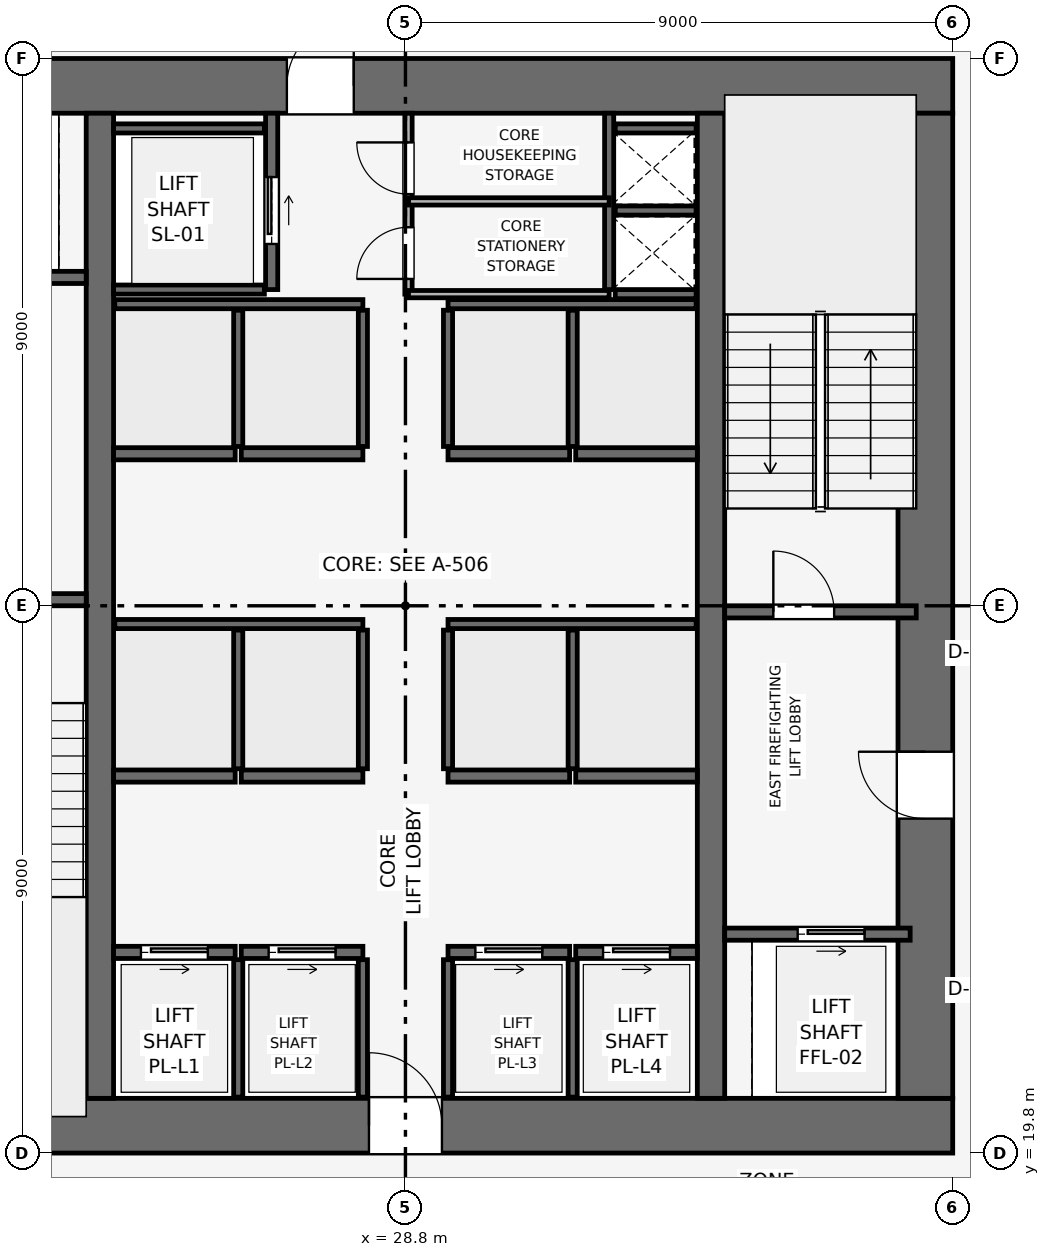
"""IFC4 building model, lengths in metres.
Left out: names, types, materials, properties, quantities, classifications, styles, units other than length and angle.
Written with IfcOpenShell. Run it as: python <this file> out.ifc"""

import sys

from ifc_helpers import new_model, si_unit, direction, frame, frame_2d, origin, place, context, subcontext, project, spatial, rectangle, extrude, element, fill, save


model = new_model("IFC4")
c1 = context("Model", 3, precision=1e-05, world=origin(), true_north=direction((0.0, 1.0)))
c2 = subcontext(c1, "Body", "Model", "MODEL_VIEW")
j1 = project(units=[si_unit("LENGTHUNIT", "METRE"), si_unit("PLANEANGLEUNIT", "RADIAN")], contexts=[c1])
p1 = place(None, origin())
s1 = spatial("IfcSite", under=j1, at=p1, CompositionType="ELEMENT")
p2 = place(p1, origin())
s2 = spatial("IfcBuilding", under=s1, at=p2, CompositionType="ELEMENT")
p3 = place(p2, frame((0.0, 0.0, 129.0)))
s3 = spatial("IfcBuildingStorey", under=s2, at=p3, CompositionType="ELEMENT", Elevation=129.0)
p4 = place(p3, frame((19.8, 20.25, 0.0), z_axis=(0.0, 0.0, 1.0), x_axis=(1.0, 0.0, 0.0)))
e1 = element("IfcWall", 1, at=p4, inside=s3, PredefinedType="SHEAR", context=c2, shape_type="SweptSolid", body=[
    extrude(rectangle(XDim=18.0, YDim=0.9, at=frame_2d((9.0, 0.0))), origin(), (0.0, 0.0, 1.0), 3.9),
])
p5 = place(p4, frame((8.4, 0.0, 0.0)))
e2 = element("IfcOpeningElement", 2, at=p5, cuts=e1, PredefinedType="OPENING", context=c2, shape_type="SweptSolid", body=[
    extrude(rectangle(XDim=1.2, YDim=2.2, at=frame_2d((0.6, 1.1))), frame((0.0, 0.46, 0.0), z_axis=(0.0, -1.0, 0.0), x_axis=(1.0, 0.0, 0.0)), (0.0, 0.0, 1.0), 0.92),
])
p6 = place(p3, frame((19.8, 37.35, 0.0), z_axis=(0.0, 0.0, 1.0), x_axis=(1.0, 0.0, 0.0)))
e3 = element("IfcWall", 3, at=p6, inside=s3, PredefinedType="SHEAR", context=c2, shape_type="SweptSolid", body=[
    extrude(rectangle(XDim=18.0, YDim=0.9, at=frame_2d((9.0, 0.0))), origin(), (0.0, 0.0, 1.0), 3.9),
])
p7 = place(p6, frame((7.05, 0.0, 0.0)))
e4 = element("IfcOpeningElement", 4, at=p7, cuts=e3, PredefinedType="OPENING", context=c2, shape_type="SweptSolid", body=[
    extrude(rectangle(XDim=1.1, YDim=2.15, at=frame_2d((0.55, 1.075))), frame((0.0, 0.46, 0.0), z_axis=(0.0, -1.0, 0.0), x_axis=(1.0, 0.0, 0.0)), (0.0, 0.0, 1.0), 0.92),
])
p8 = place(p3, frame((37.35, 20.7, 0.0), z_axis=(0.0, 0.0, 1.0), x_axis=(0.0, 1.0, 0.0)))
e5 = element("IfcWall", 5, at=p8, inside=s3, PredefinedType="SHEAR", context=c2, shape_type="SweptSolid", body=[
    extrude(rectangle(XDim=16.2, YDim=0.9, at=frame_2d((8.1, 0.0))), origin(), (0.0, 0.0, 1.0), 3.9),
])
p9 = place(p8, frame((4.6, 0.0, 0.0)))
e6 = element("IfcOpeningElement", 6, at=p9, cuts=e5, PredefinedType="OPENING", context=c2, shape_type="SweptSolid", body=[
    extrude(rectangle(XDim=1.1, YDim=2.15, at=frame_2d((0.55, 1.075))), frame((0.0, 0.46, 0.0), z_axis=(0.0, -1.0, 0.0), x_axis=(1.0, 0.0, 0.0)), (0.0, 0.0, 1.0), 0.92),
])
for number, where, z_axis, x_axis in (
    (7, (23.775, 20.7, 0.0), (0.0, 0.0, 1.0), (0.0, 1.0, 0.0)),
    (8, (33.825, 20.7, 0.0), (0.0, 0.0, 1.0), (0.0, 1.0, 0.0)),
):
    element("IfcWall", number, at=place(p3, frame(where, z_axis=z_axis, x_axis=x_axis)), inside=s3, PredefinedType="SHEAR", context=c2, shape_type="SweptSolid", body=[
        extrude(rectangle(XDim=16.2, YDim=0.45, at=frame_2d((8.1, 0.0))), origin(), (0.0, 0.0, 1.0), 3.9),
    ])
p10 = place(p3, frame((20.4, 28.9, 0.0), z_axis=(0.0, 0.0, 1.0), x_axis=(1.0, 0.0, 0.0)))
e9 = element("IfcWall", 9, at=p10, inside=s3, PredefinedType="SHEAR", context=c2, shape_type="SweptSolid", body=[
    extrude(rectangle(XDim=3.15, YDim=0.2, at=frame_2d((1.575, 0.0))), origin(), (0.0, 0.0, 1.0), 3.65),
])
p11 = place(p10, frame((0.8, 0.0, 0.0)))
e10 = element("IfcOpeningElement", 10, at=p11, cuts=e9, PredefinedType="OPENING", context=c2, shape_type="SweptSolid", body=[
    extrude(rectangle(XDim=1.0, YDim=2.1, at=frame_2d((0.5, 1.05))), frame((0.0, 0.11, 0.0), z_axis=(0.0, -1.0, 0.0), x_axis=(1.0, 0.0, 0.0)), (0.0, 0.0, 1.0), 0.22),
])
p12 = place(p3, frame((34.05, 28.7, 0.0), z_axis=(0.0, 0.0, 1.0), x_axis=(1.0, 0.0, 0.0)))
e11 = element("IfcWall", 11, at=p12, inside=s3, PredefinedType="SHEAR", context=c2, shape_type="SweptSolid", body=[
    extrude(rectangle(XDim=3.15, YDim=0.2, at=frame_2d((1.575, 0.0))), origin(), (0.0, 0.0, 1.0), 3.65),
])
p13 = place(p12, frame((0.8, 0.0, 0.0)))
e12 = element("IfcOpeningElement", 12, at=p13, cuts=e11, PredefinedType="OPENING", context=c2, shape_type="SweptSolid", body=[
    extrude(rectangle(XDim=1.0, YDim=2.1, at=frame_2d((0.5, 1.05))), frame((0.0, 0.11, 0.0), z_axis=(0.0, -1.0, 0.0), x_axis=(1.0, 0.0, 0.0)), (0.0, 0.0, 1.0), 0.22),
])
p14 = place(p3, frame((32.15, 34.0, 0.0), z_axis=(0.0, 0.0, 1.0), x_axis=(0.0, 1.0, 0.0)))
e13 = element("IfcWall", 13, at=p14, inside=s3, PredefinedType="SHEAR", context=c2, shape_type="SweptSolid", body=[
    extrude(rectangle(XDim=2.9, YDim=0.15, at=frame_2d((1.45, 0.0))), origin(), (0.0, 0.0, 1.0), 3.65),
])
for number, where, z_axis, x_axis in (
    (14, (32.25, 33.925, 0.0), (0.0, 0.0, 1.0), (1.0, 0.0, 0.0)),
    (15, (32.25, 35.3, 0.0), (0.0, 0.0, 1.0), (1.0, 0.0, 0.0)),
):
    element("IfcWall", number, at=place(p3, frame(where, z_axis=z_axis, x_axis=x_axis)), inside=s3, PredefinedType="SHEAR", context=c2, shape_type="SweptSolid", body=[
        extrude(rectangle(XDim=1.33, YDim=0.15, at=frame_2d((0.665, 0.0))), origin(), (0.0, 0.0, 1.0), 3.65),
    ])
p15 = place(p3, frame((20.5, 34.2, 0.0), z_axis=(0.0, 0.0, 1.0), x_axis=(1.0, 0.0, 0.0)))
e16 = element("IfcWall", 16, at=p15, inside=s3, PredefinedType="SHEAR", context=c2, shape_type="SweptSolid", body=[
    extrude(rectangle(XDim=3.05, YDim=0.2, at=frame_2d((1.525, 0.0))), origin(), (0.0, 0.0, 1.0), 3.65),
])
p16 = place(p15, frame((0.75, 0.0, 0.0)))
e17 = element("IfcOpeningElement", 17, at=p16, cuts=e16, PredefinedType="OPENING", context=c2, shape_type="SweptSolid", body=[
    extrude(rectangle(XDim=1.1, YDim=2.15, at=frame_2d((0.55, 1.075))), frame((0.0, 0.11, 0.0), z_axis=(0.0, -1.0, 0.0), x_axis=(1.0, 0.0, 0.0)), (0.0, 0.0, 1.0), 0.22),
])
p17 = place(p3, frame((34.05, 23.4, 0.0), z_axis=(0.0, 0.0, 1.0), x_axis=(1.0, 0.0, 0.0)))
e18 = element("IfcWall", 18, at=p17, inside=s3, PredefinedType="SHEAR", context=c2, shape_type="SweptSolid", body=[
    extrude(rectangle(XDim=3.05, YDim=0.2, at=frame_2d((1.525, 0.0))), origin(), (0.0, 0.0, 1.0), 3.65),
])
p18 = place(p17, frame((1.2, 0.0, 0.0)))
e19 = element("IfcOpeningElement", 19, at=p18, cuts=e18, PredefinedType="OPENING", context=c2, shape_type="SweptSolid", body=[
    extrude(rectangle(XDim=1.1, YDim=2.15, at=frame_2d((0.55, 1.075))), frame((0.0, 0.11, 0.0), z_axis=(0.0, -1.0, 0.0), x_axis=(1.0, 0.0, 0.0)), (0.0, 0.0, 1.0), 0.22),
])
p19 = place(p3, frame((26.6, 34.0, 0.0), z_axis=(0.0, 0.0, 1.0), x_axis=(0.0, 1.0, 0.0)))
e20 = element("IfcWall", 20, at=p19, inside=s3, PredefinedType="SHEAR", context=c2, shape_type="SweptSolid", body=[
    extrude(rectangle(XDim=2.9, YDim=0.2, at=frame_2d((1.45, 0.0))), origin(), (0.0, 0.0, 1.0), 3.65),
])
p20 = place(p19, frame((0.75, 0.0, 0.0)))
e21 = element("IfcOpeningElement", 21, at=p20, cuts=e20, PredefinedType="OPENING", context=c2, shape_type="SweptSolid", body=[
    extrude(rectangle(XDim=1.1, YDim=2.15, at=frame_2d((0.55, 1.075))), frame((0.0, 0.11, 0.0), z_axis=(0.0, -1.0, 0.0), x_axis=(1.0, 0.0, 0.0)), (0.0, 0.0, 1.0), 0.22),
])
for number, where, z_axis, x_axis in (
    (22, (24.0, 34.0, 0.0), (0.0, 0.0, 1.0), (1.0, 0.0, 0.0)),
    (23, (24.0, 36.65, 0.0), (0.0, 0.0, 1.0), (1.0, 0.0, 0.0)),
):
    element("IfcWall", number, at=place(p3, frame(where, z_axis=z_axis, x_axis=x_axis)), inside=s3, PredefinedType="SHEAR", context=c2, shape_type="SweptSolid", body=[
        extrude(rectangle(XDim=2.48, YDim=0.15, at=frame_2d((1.24, 0.0))), origin(), (0.0, 0.0, 1.0), 3.65),
    ])
p21 = place(p3, frame((24.0, 23.1, 0.0), z_axis=(0.0, 0.0, 1.0), x_axis=(1.0, 0.0, 0.0)))
e24 = element("IfcWall", 24, at=p21, inside=s3, PredefinedType="SHEAR", context=c2, shape_type="SweptSolid", body=[
    extrude(rectangle(XDim=2.0, YDim=0.2, at=frame_2d((1.0, 0.0))), origin(), (0.0, 0.0, 1.0), 3.65),
])
p22 = place(p21, frame((0.45, 0.0, 0.0)))
e25 = element("IfcOpeningElement", 25, at=p22, cuts=e24, PredefinedType="OPENING", context=c2, shape_type="SweptSolid", body=[
    extrude(rectangle(XDim=1.1, YDim=2.15, at=frame_2d((0.55, 1.075))), frame((0.0, 0.11, 0.0), z_axis=(0.0, -1.0, 0.0), x_axis=(1.0, 0.0, 0.0)), (0.0, 0.0, 1.0), 0.22),
])
p23 = place(p3, frame((26.1, 23.1, 0.0), z_axis=(0.0, 0.0, 1.0), x_axis=(1.0, 0.0, 0.0)))
e26 = element("IfcWall", 26, at=p23, inside=s3, PredefinedType="SHEAR", context=c2, shape_type="SweptSolid", body=[
    extrude(rectangle(XDim=2.0, YDim=0.2, at=frame_2d((1.0, 0.0))), origin(), (0.0, 0.0, 1.0), 3.65),
])
p24 = place(p23, frame((0.45, 0.0, 0.0)))
e27 = element("IfcOpeningElement", 27, at=p24, cuts=e26, PredefinedType="OPENING", context=c2, shape_type="SweptSolid", body=[
    extrude(rectangle(XDim=1.1, YDim=2.15, at=frame_2d((0.55, 1.075))), frame((0.0, 0.11, 0.0), z_axis=(0.0, -1.0, 0.0), x_axis=(1.0, 0.0, 0.0)), (0.0, 0.0, 1.0), 0.22),
])
p25 = place(p3, frame((29.5, 23.1, 0.0), z_axis=(0.0, 0.0, 1.0), x_axis=(1.0, 0.0, 0.0)))
e28 = element("IfcWall", 28, at=p25, inside=s3, PredefinedType="SHEAR", context=c2, shape_type="SweptSolid", body=[
    extrude(rectangle(XDim=2.0, YDim=0.2, at=frame_2d((1.0, 0.0))), origin(), (0.0, 0.0, 1.0), 3.65),
])
p26 = place(p25, frame((0.45, 0.0, 0.0)))
e29 = element("IfcOpeningElement", 29, at=p26, cuts=e28, PredefinedType="OPENING", context=c2, shape_type="SweptSolid", body=[
    extrude(rectangle(XDim=1.1, YDim=2.15, at=frame_2d((0.55, 1.075))), frame((0.0, 0.11, 0.0), z_axis=(0.0, -1.0, 0.0), x_axis=(1.0, 0.0, 0.0)), (0.0, 0.0, 1.0), 0.22),
])
p27 = place(p3, frame((31.6, 23.1, 0.0), z_axis=(0.0, 0.0, 1.0), x_axis=(1.0, 0.0, 0.0)))
e30 = element("IfcWall", 30, at=p27, inside=s3, PredefinedType="SHEAR", context=c2, shape_type="SweptSolid", body=[
    extrude(rectangle(XDim=2.0, YDim=0.2, at=frame_2d((1.0, 0.0))), origin(), (0.0, 0.0, 1.0), 3.65),
])
p28 = place(p27, frame((0.45, 0.0, 0.0)))
e31 = element("IfcOpeningElement", 31, at=p28, cuts=e30, PredefinedType="OPENING", context=c2, shape_type="SweptSolid", body=[
    extrude(rectangle(XDim=1.1, YDim=2.15, at=frame_2d((0.55, 1.075))), frame((0.0, 0.11, 0.0), z_axis=(0.0, -1.0, 0.0), x_axis=(1.0, 0.0, 0.0)), (0.0, 0.0, 1.0), 0.22),
])
for number, where, z_axis, x_axis in (
    (32, (24.0, 26.0, 0.0), (0.0, 0.0, 1.0), (1.0, 0.0, 0.0)),
    (33, (26.1, 26.0, 0.0), (0.0, 0.0, 1.0), (1.0, 0.0, 0.0)),
    (34, (29.5, 26.0, 0.0), (0.0, 0.0, 1.0), (1.0, 0.0, 0.0)),
    (35, (31.6, 26.0, 0.0), (0.0, 0.0, 1.0), (1.0, 0.0, 0.0)),
    (36, (24.0, 31.3, 0.0), (0.0, 0.0, 1.0), (1.0, 0.0, 0.0)),
    (37, (26.1, 31.3, 0.0), (0.0, 0.0, 1.0), (1.0, 0.0, 0.0)),
    (38, (29.5, 31.3, 0.0), (0.0, 0.0, 1.0), (1.0, 0.0, 0.0)),
    (39, (31.6, 31.3, 0.0), (0.0, 0.0, 1.0), (1.0, 0.0, 0.0)),
):
    element("IfcWall", number, at=place(p3, frame(where, z_axis=z_axis, x_axis=x_axis)), inside=s3, PredefinedType="SHEAR", context=c2, shape_type="SweptSolid", body=[
        extrude(rectangle(XDim=2.0, YDim=0.2, at=frame_2d((1.0, 0.0))), origin(), (0.0, 0.0, 1.0), 3.65),
    ])
p29 = place(p3, frame((32.25, 36.65, 0.0), z_axis=(0.0, 0.0, 1.0), x_axis=(1.0, 0.0, 0.0)))
e40 = element("IfcWall", 40, at=p29, inside=s3, PredefinedType="SHEAR", context=c2, shape_type="SweptSolid", body=[
    extrude(rectangle(XDim=1.33, YDim=0.15, at=frame_2d((0.665, 0.0))), origin(), (0.0, 0.0, 1.0), 3.65),
])
for number, where, z_axis, x_axis in (
    (41, (26.05, 20.72, 0.0), (0.0, 0.0, 1.0), (0.0, 1.0, 0.0)),
    (42, (28.1, 20.72, 0.0), (0.0, 0.0, 1.0), (0.0, 1.0, 0.0)),
    (43, (29.5, 20.72, 0.0), (0.0, 0.0, 1.0), (0.0, 1.0, 0.0)),
    (44, (31.55, 20.72, 0.0), (0.0, 0.0, 1.0), (0.0, 1.0, 0.0)),
):
    element("IfcWall", number, at=place(p3, frame(where, z_axis=z_axis, x_axis=x_axis)), inside=s3, PredefinedType="SHEAR", context=c2, shape_type="SweptSolid", body=[
        extrude(rectangle(XDim=2.26, YDim=0.15, at=frame_2d((1.13, 0.0))), origin(), (0.0, 0.0, 1.0), 3.65),
    ])
for number, where, z_axis, x_axis in (
    (45, (24.02, 28.5, 0.0), (0.0, 0.0, 1.0), (1.0, 0.0, 0.0)),
    (46, (29.5, 28.5, 0.0), (0.0, 0.0, 1.0), (1.0, 0.0, 0.0)),
):
    element("IfcWall", number, at=place(p3, frame(where, z_axis=z_axis, x_axis=x_axis)), inside=s3, PredefinedType="SHEAR", context=c2, shape_type="SweptSolid", body=[
        extrude(rectangle(XDim=4.08, YDim=0.15, at=frame_2d((2.04, 0.0))), origin(), (0.0, 0.0, 1.0), 3.65),
    ])
for number, where, z_axis, x_axis in (
    (47, (26.05, 26.12, 0.0), (0.0, 0.0, 1.0), (0.0, 1.0, 0.0)),
    (48, (28.1, 26.12, 0.0), (0.0, 0.0, 1.0), (0.0, 1.0, 0.0)),
    (49, (29.5, 26.12, 0.0), (0.0, 0.0, 1.0), (0.0, 1.0, 0.0)),
    (50, (31.55, 26.12, 0.0), (0.0, 0.0, 1.0), (0.0, 1.0, 0.0)),
):
    element("IfcWall", number, at=place(p3, frame(where, z_axis=z_axis, x_axis=x_axis)), inside=s3, PredefinedType="SHEAR", context=c2, shape_type="SweptSolid", body=[
        extrude(rectangle(XDim=2.28, YDim=0.15, at=frame_2d((1.14, 0.0))), origin(), (0.0, 0.0, 1.0), 3.65),
    ])
for number, where, z_axis, x_axis in (
    (51, (24.02, 33.76, 0.0), (0.0, 0.0, 1.0), (1.0, 0.0, 0.0)),
    (52, (29.5, 33.76, 0.0), (0.0, 0.0, 1.0), (1.0, 0.0, 0.0)),
):
    element("IfcWall", number, at=place(p3, frame(where, z_axis=z_axis, x_axis=x_axis)), inside=s3, PredefinedType="SHEAR", context=c2, shape_type="SweptSolid", body=[
        extrude(rectangle(XDim=4.08, YDim=0.15, at=frame_2d((2.04, 0.0))), origin(), (0.0, 0.0, 1.0), 3.65),
    ])
for number, where, z_axis, x_axis in (
    (53, (26.05, 31.42, 0.0), (0.0, 0.0, 1.0), (0.0, 1.0, 0.0)),
    (54, (28.1, 31.42, 0.0), (0.0, 0.0, 1.0), (0.0, 1.0, 0.0)),
    (55, (29.5, 31.42, 0.0), (0.0, 0.0, 1.0), (0.0, 1.0, 0.0)),
    (56, (31.55, 31.42, 0.0), (0.0, 0.0, 1.0), (0.0, 1.0, 0.0)),
):
    element("IfcWall", number, at=place(p3, frame(where, z_axis=z_axis, x_axis=x_axis)), inside=s3, PredefinedType="SHEAR", context=c2, shape_type="SweptSolid", body=[
        extrude(rectangle(XDim=2.24, YDim=0.15, at=frame_2d((1.12, 0.0))), origin(), (0.0, 0.0, 1.0), 3.65),
    ])
p30 = place(p3, frame((28.85, 33.925, 0.0), z_axis=(0.0, 0.0, 1.0), x_axis=(0.0, 1.0, 0.0)))
e57 = element("IfcWall", 57, at=p30, inside=s3, PredefinedType="PARTITIONING", context=c2, shape_type="SweptSolid", body=[
    extrude(rectangle(XDim=2.975, YDim=0.12, at=frame_2d((1.487, 0.0))), origin(), (0.0, 0.0, 1.0), 3.65),
])
p31 = place(p30, frame((0.25, 0.0, 0.0)))
e58 = element("IfcOpeningElement", 58, at=p31, cuts=e57, PredefinedType="OPENING", context=c2, shape_type="SweptSolid", body=[
    extrude(rectangle(XDim=0.85, YDim=2.1, at=frame_2d((0.425, 1.05))), frame((0.0, 0.07, 0.0), z_axis=(0.0, -1.0, 0.0), x_axis=(1.0, 0.0, 0.0)), (0.0, 0.0, 1.0), 0.14),
])
p32 = place(p30, frame((1.645, 0.0, 0.0)))
e59 = element("IfcOpeningElement", 59, at=p32, cuts=e57, PredefinedType="OPENING", context=c2, shape_type="SweptSolid", body=[
    extrude(rectangle(XDim=0.85, YDim=2.1, at=frame_2d((0.425, 1.05))), frame((0.0, 0.07, 0.0), z_axis=(0.0, -1.0, 0.0), x_axis=(1.0, 0.0, 0.0)), (0.0, 0.0, 1.0), 0.14),
])
for number, where, z_axis, x_axis in (
    (60, (28.85, 35.45, 0.0), (0.0, 0.0, 1.0), (1.0, 0.0, 0.0)),
    (61, (28.85, 33.925, 0.0), (0.0, 0.0, 1.0), (1.0, 0.0, 0.0)),
):
    element("IfcWall", number, at=place(p3, frame(where, z_axis=z_axis, x_axis=x_axis)), inside=s3, PredefinedType="PARTITIONING", context=c2, shape_type="SweptSolid", body=[
        extrude(rectangle(XDim=3.3, YDim=0.12, at=frame_2d((1.65, 0.0))), origin(), (0.0, 0.0, 1.0), 3.65),
    ])
p33 = place(p13, origin())
e62 = element("IfcDoor", 62, at=p33, inside=s3, OperationType="SINGLE_SWING_LEFT", PredefinedType="DOOR", context=c2, shape_type="SweptSolid", body=[
    extrude(rectangle(XDim=1.0, YDim=2.1, at=frame_2d((0.5, 1.05))), frame((0.0, 0.025, 0.0), z_axis=(0.0, -1.0, 0.0), x_axis=(1.0, 0.0, 0.0)), (0.0, 0.0, 1.0), 0.05),
])
fill(e12, e62)
p34 = place(p18, origin())
e63 = element("IfcDoor", 63, at=p34, inside=s3, OperationType="SLIDING_TO_RIGHT", PredefinedType="DOOR", context=c2, shape_type="SweptSolid", body=[
    extrude(rectangle(XDim=1.1, YDim=2.15, at=frame_2d((0.55, 1.075))), frame((0.0, 0.025, 0.0), z_axis=(0.0, -1.0, 0.0), x_axis=(1.0, 0.0, 0.0)), (0.0, 0.0, 1.0), 0.05),
])
fill(e19, e63)
p35 = place(p20, origin())
e64 = element("IfcDoor", 64, at=p35, inside=s3, OperationType="SLIDING_TO_RIGHT", PredefinedType="DOOR", context=c2, shape_type="SweptSolid", body=[
    extrude(rectangle(XDim=1.1, YDim=2.15, at=frame_2d((0.55, 1.075))), frame((0.0, 0.025, 0.0), z_axis=(0.0, -1.0, 0.0), x_axis=(1.0, 0.0, 0.0)), (0.0, 0.0, 1.0), 0.05),
])
fill(e21, e64)
p36 = place(p22, origin())
e65 = element("IfcDoor", 65, at=p36, inside=s3, OperationType="SLIDING_TO_RIGHT", PredefinedType="DOOR", context=c2, shape_type="SweptSolid", body=[
    extrude(rectangle(XDim=1.1, YDim=2.15, at=frame_2d((0.55, 1.075))), frame((0.0, 0.025, 0.0), z_axis=(0.0, -1.0, 0.0), x_axis=(1.0, 0.0, 0.0)), (0.0, 0.0, 1.0), 0.05),
])
fill(e25, e65)
p37 = place(p24, origin())
e66 = element("IfcDoor", 66, at=p37, inside=s3, OperationType="SLIDING_TO_RIGHT", PredefinedType="DOOR", context=c2, shape_type="SweptSolid", body=[
    extrude(rectangle(XDim=1.1, YDim=2.15, at=frame_2d((0.55, 1.075))), frame((0.0, 0.025, 0.0), z_axis=(0.0, -1.0, 0.0), x_axis=(1.0, 0.0, 0.0)), (0.0, 0.0, 1.0), 0.05),
])
fill(e27, e66)
p38 = place(p26, origin())
e67 = element("IfcDoor", 67, at=p38, inside=s3, OperationType="SLIDING_TO_RIGHT", PredefinedType="DOOR", context=c2, shape_type="SweptSolid", body=[
    extrude(rectangle(XDim=1.1, YDim=2.15, at=frame_2d((0.55, 1.075))), frame((0.0, 0.025, 0.0), z_axis=(0.0, -1.0, 0.0), x_axis=(1.0, 0.0, 0.0)), (0.0, 0.0, 1.0), 0.05),
])
fill(e29, e67)
p39 = place(p28, origin())
e68 = element("IfcDoor", 68, at=p39, inside=s3, OperationType="SLIDING_TO_RIGHT", PredefinedType="DOOR", context=c2, shape_type="SweptSolid", body=[
    extrude(rectangle(XDim=1.1, YDim=2.15, at=frame_2d((0.55, 1.075))), frame((0.0, 0.025, 0.0), z_axis=(0.0, -1.0, 0.0), x_axis=(1.0, 0.0, 0.0)), (0.0, 0.0, 1.0), 0.05),
])
fill(e31, e68)
p40 = place(p31, origin())
e69 = element("IfcDoor", 69, at=p40, inside=s3, OperationType="SINGLE_SWING_LEFT", PredefinedType="DOOR", context=c2, shape_type="SweptSolid", body=[
    extrude(rectangle(XDim=0.85, YDim=2.1, at=frame_2d((0.425, 1.05))), frame((0.0, 0.025, 0.0), z_axis=(0.0, -1.0, 0.0), x_axis=(1.0, 0.0, 0.0)), (0.0, 0.0, 1.0), 0.05),
])
fill(e58, e69)
p41 = place(p32, origin())
e70 = element("IfcDoor", 70, at=p41, inside=s3, OperationType="SINGLE_SWING_RIGHT", PredefinedType="DOOR", context=c2, shape_type="SweptSolid", body=[
    extrude(rectangle(XDim=0.85, YDim=2.1, at=frame_2d((0.425, 1.05))), frame((0.0, 0.025, 0.0), z_axis=(0.0, -1.0, 0.0), x_axis=(1.0, 0.0, 0.0)), (0.0, 0.0, 1.0), 0.05),
])
fill(e59, e70)
p42 = place(p9, origin())
e71 = element("IfcDoor", 71, at=p42, inside=s3, OperationType="SINGLE_SWING_RIGHT", PredefinedType="DOOR", context=c2, shape_type="SweptSolid", body=[
    extrude(rectangle(XDim=1.1, YDim=2.15, at=frame_2d((0.55, 1.075))), frame((0.0, 0.025, 0.0), z_axis=(0.0, -1.0, 0.0), x_axis=(1.0, 0.0, 0.0)), (0.0, 0.0, 1.0), 0.05),
])
fill(e6, e71)
p43 = place(p5, origin())
e72 = element("IfcDoor", 72, at=p43, inside=s3, OperationType="SINGLE_SWING_LEFT", PredefinedType="DOOR", context=c2, shape_type="SweptSolid", body=[
    extrude(rectangle(XDim=1.2, YDim=2.2, at=frame_2d((0.6, 1.1))), frame((0.0, 0.025, 0.0), z_axis=(0.0, -1.0, 0.0), x_axis=(1.0, 0.0, 0.0)), (0.0, 0.0, 1.0), 0.05),
])
fill(e2, e72)
p44 = place(p7, origin())
e73 = element("IfcDoor", 73, at=p44, inside=s3, OperationType="SINGLE_SWING_RIGHT", PredefinedType="DOOR", context=c2, shape_type="SweptSolid", body=[
    extrude(rectangle(XDim=1.1, YDim=2.15, at=frame_2d((0.55, 1.075))), frame((0.0, 0.025, 0.0), z_axis=(0.0, -1.0, 0.0), x_axis=(1.0, 0.0, 0.0)), (0.0, 0.0, 1.0), 0.05),
])
fill(e4, e73)
save(model, sys.argv[1])
